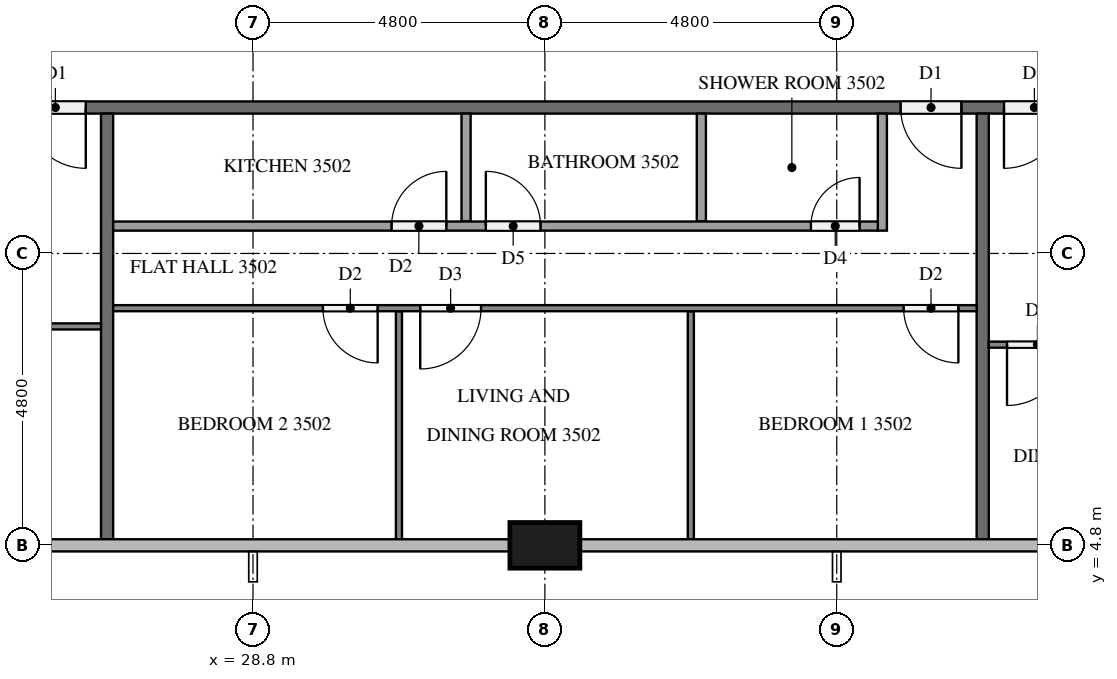
"""IFC4 building model, lengths in metres.
Left out: names, types, materials, properties, quantities, classifications, styles, units other than length and angle.
Written with IfcOpenShell. Run it as: python <this file> out.ifc"""

import sys

from ifc_helpers import new_model, si_unit, direction, frame, frame_2d, origin, origin_2d, place, context, subcontext, project, spatial, rectangle, extrude, element, fill, save


model = new_model("IFC4")
c1 = context("Model", 3, precision=1e-05, world=origin(), true_north=direction((0.0, 1.0)))
c2 = subcontext(c1, "Body", "Model", "MODEL_VIEW")
j1 = project(units=[si_unit("LENGTHUNIT", "METRE"), si_unit("PLANEANGLEUNIT", "RADIAN")], contexts=[c1])
p1 = place(None, origin())
s1 = spatial("IfcSite", under=j1, at=p1, CompositionType="ELEMENT")
p2 = place(p1, origin())
s2 = spatial("IfcBuilding", under=s1, at=p2, CompositionType="ELEMENT")
p3 = place(p2, frame((0.0, 0.0, 136.6)))
s3 = spatial("IfcBuildingStorey", under=s2, at=p3, CompositionType="ELEMENT", Elevation=136.6)
p4 = place(p3, frame((33.6, 4.8, 0.0), z_axis=(0.0, 0.0, 1.0), x_axis=(1.0, 0.0, 0.0)))
e1 = element("IfcColumn", 1, at=p4, inside=s3, PredefinedType="COLUMN", context=c2, shape_type="SweptSolid", body=[
    extrude(rectangle(XDim=1.15, YDim=0.75, at=origin_2d()), origin(), (0.0, 0.0, 1.0), 3.2),
])
p5 = place(p3, frame((50.5, 12.0, 0.0), z_axis=(0.0, 0.0, 1.0), x_axis=(-1.0, 0.0, 0.0)))
e2 = element("IfcWall", 2, at=p5, inside=s3, PredefinedType="PARTITIONING", context=c2, shape_type="SweptSolid", body=[
    extrude(rectangle(XDim=38.6, YDim=0.2, at=frame_2d((19.3, 0.0))), origin(), (0.0, 0.0, 1.0), 3.2),
])
p6 = place(p5, frame((24.45, 0.0, 0.0)))
e3 = element("IfcOpeningElement", 3, at=p6, cuts=e2, PredefinedType="OPENING", context=c2, shape_type="SweptSolid", body=[
    extrude(rectangle(XDim=1.0, YDim=2.1, at=frame_2d((0.5, 1.05))), frame((0.0, 0.11, 0.0), z_axis=(0.0, -1.0, 0.0), x_axis=(1.0, 0.0, 0.0)), (0.0, 0.0, 1.0), 0.22),
])
p7 = place(p5, frame((10.05, 0.0, 0.0)))
e4 = element("IfcOpeningElement", 4, at=p7, cuts=e2, PredefinedType="OPENING", context=c2, shape_type="SweptSolid", body=[
    extrude(rectangle(XDim=1.0, YDim=2.1, at=frame_2d((0.5, 1.05))), frame((0.0, 0.11, 0.0), z_axis=(0.0, -1.0, 0.0), x_axis=(1.0, 0.0, 0.0)), (0.0, 0.0, 1.0), 0.22),
])
p8 = place(p5, frame((8.35, 0.0, 0.0)))
e5 = element("IfcOpeningElement", 5, at=p8, cuts=e2, PredefinedType="OPENING", context=c2, shape_type="SweptSolid", body=[
    extrude(rectangle(XDim=1.0, YDim=2.1, at=frame_2d((0.5, 1.05))), frame((0.0, 0.11, 0.0), z_axis=(0.0, -1.0, 0.0), x_axis=(1.0, 0.0, 0.0)), (0.0, 0.0, 1.0), 0.22),
])
for number, where, z_axis, x_axis in (
    (6, (26.4, 11.9, 0.0), (0.0, 0.0, 1.0), (0.0, -1.0, 0.0)),
    (7, (40.8, 11.9, 0.0), (0.0, 0.0, 1.0), (0.0, -1.0, 0.0)),
):
    element("IfcWall", number, at=place(p3, frame(where, z_axis=z_axis, x_axis=x_axis)), inside=s3, PredefinedType="PARTITIONING", context=c2, shape_type="SweptSolid", body=[
        extrude(rectangle(XDim=7.0, YDim=0.2, at=frame_2d((3.5, 0.0))), origin(), (0.0, 0.0, 1.0), 3.2),
    ])
p9 = place(p3, frame((26.3, 8.4, 0.0), z_axis=(0.0, 0.0, 1.0), x_axis=(-1.0, 0.0, 0.0)))
e8 = element("IfcWall", 8, at=p9, inside=s3, PredefinedType="PARTITIONING", context=c2, shape_type="SweptSolid", body=[
    extrude(rectangle(XDim=14.2, YDim=0.1, at=frame_2d((7.1, 0.0))), origin(), (0.0, 0.0, 1.0), 3.2),
])
p10 = place(p9, frame((3.45, 0.0, 0.0)))
e9 = element("IfcOpeningElement", 9, at=p10, cuts=e8, PredefinedType="OPENING", context=c2, shape_type="SweptSolid", body=[
    extrude(rectangle(XDim=0.9, YDim=2.1, at=frame_2d((0.45, 1.05))), frame((0.0, 0.06, 0.0), z_axis=(0.0, -1.0, 0.0), x_axis=(1.0, 0.0, 0.0)), (0.0, 0.0, 1.0), 0.12),
])
p11 = place(p9, frame((5.05, 0.0, 0.0)))
e10 = element("IfcOpeningElement", 10, at=p11, cuts=e8, PredefinedType="OPENING", context=c2, shape_type="SweptSolid", body=[
    extrude(rectangle(XDim=1.0, YDim=2.1, at=frame_2d((0.5, 1.05))), frame((0.0, 0.06, 0.0), z_axis=(0.0, -1.0, 0.0), x_axis=(1.0, 0.0, 0.0)), (0.0, 0.0, 1.0), 0.12),
])
p12 = place(p9, frame((13.0, 0.0, 0.0)))
e11 = element("IfcOpeningElement", 11, at=p12, cuts=e8, PredefinedType="OPENING", context=c2, shape_type="SweptSolid", body=[
    extrude(rectangle(XDim=0.9, YDim=2.1, at=frame_2d((0.45, 1.05))), frame((0.0, 0.06, 0.0), z_axis=(0.0, -1.0, 0.0), x_axis=(1.0, 0.0, 0.0)), (0.0, 0.0, 1.0), 0.12),
])
for number, where, z_axis, x_axis in (
    (12, (36.0, 8.65, 0.0), (0.0, 0.0, 1.0), (0.0, -1.0, 0.0)),
    (13, (31.2, 8.65, 0.0), (0.0, 0.0, 1.0), (0.0, -1.0, 0.0)),
):
    element("IfcWall", number, at=place(p3, frame(where, z_axis=z_axis, x_axis=x_axis)), inside=s3, PredefinedType="PARTITIONING", context=c2, shape_type="SweptSolid", body=[
        extrude(rectangle(XDim=3.75, YDim=0.1, at=frame_2d((1.875, 0.0))), origin(), (0.0, 0.0, 1.0), 3.2),
    ])
p13 = place(p3, frame((40.7, 8.7, 0.0), z_axis=(0.0, 0.0, 1.0), x_axis=(-1.0, 0.0, 0.0)))
e14 = element("IfcWall", 14, at=p13, inside=s3, PredefinedType="PARTITIONING", context=c2, shape_type="SweptSolid", body=[
    extrude(rectangle(XDim=14.2, YDim=0.1, at=frame_2d((7.1, 0.0))), origin(), (0.0, 0.0, 1.0), 3.2),
])
p14 = place(p13, frame((0.3, 0.0, 0.0)))
e15 = element("IfcOpeningElement", 15, at=p14, cuts=e14, PredefinedType="OPENING", context=c2, shape_type="SweptSolid", body=[
    extrude(rectangle(XDim=0.9, YDim=2.1, at=frame_2d((0.45, 1.05))), frame((0.0, 0.06, 0.0), z_axis=(0.0, -1.0, 0.0), x_axis=(1.0, 0.0, 0.0)), (0.0, 0.0, 1.0), 0.12),
])
p15 = place(p13, frame((8.15, 0.0, 0.0)))
e16 = element("IfcOpeningElement", 16, at=p15, cuts=e14, PredefinedType="OPENING", context=c2, shape_type="SweptSolid", body=[
    extrude(rectangle(XDim=1.0, YDim=2.1, at=frame_2d((0.5, 1.05))), frame((0.0, 0.06, 0.0), z_axis=(0.0, -1.0, 0.0), x_axis=(1.0, 0.0, 0.0)), (0.0, 0.0, 1.0), 0.12),
])
p16 = place(p13, frame((9.85, 0.0, 0.0)))
e17 = element("IfcOpeningElement", 17, at=p16, cuts=e14, PredefinedType="OPENING", context=c2, shape_type="SweptSolid", body=[
    extrude(rectangle(XDim=0.9, YDim=2.1, at=frame_2d((0.45, 1.05))), frame((0.0, 0.06, 0.0), z_axis=(0.0, -1.0, 0.0), x_axis=(1.0, 0.0, 0.0)), (0.0, 0.0, 1.0), 0.12),
])
for number, where, z_axis, x_axis in (
    (18, (36.173, 11.9, 0.0), (0.0, 0.0, 1.0), (0.0, -1.0, 0.0)),
    (19, (32.304, 11.9, 0.0), (0.0, 0.0, 1.0), (0.0, -1.0, 0.0)),
):
    element("IfcWall", number, at=place(p3, frame(where, z_axis=z_axis, x_axis=x_axis)), inside=s3, PredefinedType="PARTITIONING", context=c2, shape_type="SweptSolid", body=[
        extrude(rectangle(XDim=1.775, YDim=0.15, at=frame_2d((0.887, 0.0))), origin(), (0.0, 0.0, 1.0), 3.2),
    ])
p17 = place(p3, frame((39.15, 11.9, 0.0), z_axis=(0.0, 0.0, 1.0), x_axis=(0.0, -1.0, 0.0)))
e20 = element("IfcWall", 20, at=p17, inside=s3, PredefinedType="PARTITIONING", context=c2, shape_type="SweptSolid", body=[
    extrude(rectangle(XDim=1.925, YDim=0.15, at=frame_2d((0.962, 0.0))), origin(), (0.0, 0.0, 1.0), 3.2),
])
p18 = place(p3, frame((26.5, 10.05, 0.0), z_axis=(0.0, 0.0, 1.0), x_axis=(1.0, 0.0, 0.0)))
e21 = element("IfcWall", 21, at=p18, inside=s3, PredefinedType="PARTITIONING", context=c2, shape_type="SweptSolid", body=[
    extrude(rectangle(XDim=12.575, YDim=0.15, at=frame_2d((6.288, 0.0))), origin(), (0.0, 0.0, 1.0), 3.2),
])
p19 = place(p18, frame((11.475, 0.0, 0.0)))
e22 = element("IfcOpeningElement", 22, at=p19, cuts=e21, PredefinedType="OPENING", context=c2, shape_type="SweptSolid", body=[
    extrude(rectangle(XDim=0.8, YDim=2.1, at=frame_2d((0.4, 1.05))), frame((0.0, 0.085, 0.0), z_axis=(0.0, -1.0, 0.0), x_axis=(1.0, 0.0, 0.0)), (0.0, 0.0, 1.0), 0.17),
])
p20 = place(p18, frame((6.129, 0.0, 0.0)))
e23 = element("IfcOpeningElement", 23, at=p20, cuts=e21, PredefinedType="OPENING", context=c2, shape_type="SweptSolid", body=[
    extrude(rectangle(XDim=0.9, YDim=2.1, at=frame_2d((0.45, 1.05))), frame((0.0, 0.085, 0.0), z_axis=(0.0, -1.0, 0.0), x_axis=(1.0, 0.0, 0.0)), (0.0, 0.0, 1.0), 0.17),
])
p21 = place(p18, frame((4.579, 0.0, 0.0)))
e24 = element("IfcOpeningElement", 24, at=p21, cuts=e21, PredefinedType="OPENING", context=c2, shape_type="SweptSolid", body=[
    extrude(rectangle(XDim=0.9, YDim=2.1, at=frame_2d((0.45, 1.05))), frame((0.0, 0.085, 0.0), z_axis=(0.0, -1.0, 0.0), x_axis=(1.0, 0.0, 0.0)), (0.0, 0.0, 1.0), 0.17),
])
p22 = place(p3, frame((50.3, 8.1, 0.0), z_axis=(0.0, 0.0, 1.0), x_axis=(-1.0, 0.0, 0.0)))
e25 = element("IfcWall", 25, at=p22, inside=s3, PredefinedType="PARTITIONING", context=c2, shape_type="SweptSolid", body=[
    extrude(rectangle(XDim=9.4, YDim=0.1, at=frame_2d((4.7, 0.0))), origin(), (0.0, 0.0, 1.0), 3.2),
])
p23 = place(p22, frame((8.1, 0.0, 0.0)))
e26 = element("IfcOpeningElement", 26, at=p23, cuts=e25, PredefinedType="OPENING", context=c2, shape_type="SweptSolid", body=[
    extrude(rectangle(XDim=1.0, YDim=2.1, at=frame_2d((0.5, 1.05))), frame((0.0, 0.06, 0.0), z_axis=(0.0, -1.0, 0.0), x_axis=(1.0, 0.0, 0.0)), (0.0, 0.0, 1.0), 0.12),
])
p24 = place(p22, frame((0.3, 0.0, 0.0)))
e27 = element("IfcOpeningElement", 27, at=p24, cuts=e25, PredefinedType="OPENING", context=c2, shape_type="SweptSolid", body=[
    extrude(rectangle(XDim=0.9, YDim=2.1, at=frame_2d((0.45, 1.05))), frame((0.0, 0.06, 0.0), z_axis=(0.0, -1.0, 0.0), x_axis=(1.0, 0.0, 0.0)), (0.0, 0.0, 1.0), 0.12),
])
p25 = place(p6, origin())
e28 = element("IfcDoor", 28, at=p25, inside=s3, OperationType="SINGLE_SWING_LEFT", PredefinedType="DOOR", context=c2, shape_type="SweptSolid", body=[
    extrude(rectangle(XDim=1.0, YDim=2.1, at=frame_2d((0.5, 1.05))), frame((0.0, 0.025, 0.0), z_axis=(0.0, -1.0, 0.0), x_axis=(1.0, 0.0, 0.0)), (0.0, 0.0, 1.0), 0.05),
])
fill(e3, e28)
p26 = place(p7, origin())
e29 = element("IfcDoor", 29, at=p26, inside=s3, OperationType="SINGLE_SWING_LEFT", PredefinedType="DOOR", context=c2, shape_type="SweptSolid", body=[
    extrude(rectangle(XDim=1.0, YDim=2.1, at=frame_2d((0.5, 1.05))), frame((0.0, 0.025, 0.0), z_axis=(0.0, -1.0, 0.0), x_axis=(1.0, 0.0, 0.0)), (0.0, 0.0, 1.0), 0.05),
])
fill(e4, e29)
p27 = place(p8, origin())
e30 = element("IfcDoor", 30, at=p27, inside=s3, OperationType="SINGLE_SWING_RIGHT", PredefinedType="DOOR", context=c2, shape_type="SweptSolid", body=[
    extrude(rectangle(XDim=1.0, YDim=2.1, at=frame_2d((0.5, 1.05))), frame((0.0, 0.025, 0.0), z_axis=(0.0, -1.0, 0.0), x_axis=(1.0, 0.0, 0.0)), (0.0, 0.0, 1.0), 0.05),
])
fill(e5, e30)
p28 = place(p14, origin())
e31 = element("IfcDoor", 31, at=p28, inside=s3, OperationType="SINGLE_SWING_LEFT", PredefinedType="DOOR", context=c2, shape_type="SweptSolid", body=[
    extrude(rectangle(XDim=0.9, YDim=2.1, at=frame_2d((0.45, 1.05))), frame((0.0, 0.025, 0.0), z_axis=(0.0, -1.0, 0.0), x_axis=(1.0, 0.0, 0.0)), (0.0, 0.0, 1.0), 0.05),
])
fill(e15, e31)
p29 = place(p15, origin())
e32 = element("IfcDoor", 32, at=p29, inside=s3, OperationType="SINGLE_SWING_RIGHT", PredefinedType="DOOR", context=c2, shape_type="SweptSolid", body=[
    extrude(rectangle(XDim=1.0, YDim=2.1, at=frame_2d((0.5, 1.05))), frame((0.0, 0.025, 0.0), z_axis=(0.0, -1.0, 0.0), x_axis=(1.0, 0.0, 0.0)), (0.0, 0.0, 1.0), 0.05),
])
fill(e16, e32)
p30 = place(p16, origin())
e33 = element("IfcDoor", 33, at=p30, inside=s3, OperationType="SINGLE_SWING_LEFT", PredefinedType="DOOR", context=c2, shape_type="SweptSolid", body=[
    extrude(rectangle(XDim=0.9, YDim=2.1, at=frame_2d((0.45, 1.05))), frame((0.0, 0.025, 0.0), z_axis=(0.0, -1.0, 0.0), x_axis=(1.0, 0.0, 0.0)), (0.0, 0.0, 1.0), 0.05),
])
fill(e17, e33)
p31 = place(p19, origin())
e34 = element("IfcDoor", 34, at=p31, inside=s3, OperationType="SINGLE_SWING_RIGHT", PredefinedType="DOOR", context=c2, shape_type="SweptSolid", body=[
    extrude(rectangle(XDim=0.8, YDim=2.1, at=frame_2d((0.4, 1.05))), frame((0.0, 0.025, 0.0), z_axis=(0.0, -1.0, 0.0), x_axis=(1.0, 0.0, 0.0)), (0.0, 0.0, 1.0), 0.05),
])
fill(e22, e34)
p32 = place(p20, origin())
e35 = element("IfcDoor", 35, at=p32, inside=s3, OperationType="SINGLE_SWING_LEFT", PredefinedType="DOOR", context=c2, shape_type="SweptSolid", body=[
    extrude(rectangle(XDim=0.9, YDim=2.1, at=frame_2d((0.45, 1.05))), frame((0.0, 0.025, 0.0), z_axis=(0.0, -1.0, 0.0), x_axis=(1.0, 0.0, 0.0)), (0.0, 0.0, 1.0), 0.05),
])
fill(e23, e35)
p33 = place(p21, origin())
e36 = element("IfcDoor", 36, at=p33, inside=s3, OperationType="SINGLE_SWING_RIGHT", PredefinedType="DOOR", context=c2, shape_type="SweptSolid", body=[
    extrude(rectangle(XDim=0.9, YDim=2.1, at=frame_2d((0.45, 1.05))), frame((0.0, 0.025, 0.0), z_axis=(0.0, -1.0, 0.0), x_axis=(1.0, 0.0, 0.0)), (0.0, 0.0, 1.0), 0.05),
])
fill(e24, e36)
p34 = place(p23, origin())
e37 = element("IfcDoor", 37, at=p34, inside=s3, OperationType="SINGLE_SWING_RIGHT", PredefinedType="DOOR", context=c2, shape_type="SweptSolid", body=[
    extrude(rectangle(XDim=1.0, YDim=2.1, at=frame_2d((0.5, 1.05))), frame((0.0, 0.025, 0.0), z_axis=(0.0, -1.0, 0.0), x_axis=(1.0, 0.0, 0.0)), (0.0, 0.0, 1.0), 0.05),
])
fill(e26, e37)
save(model, sys.argv[1])
